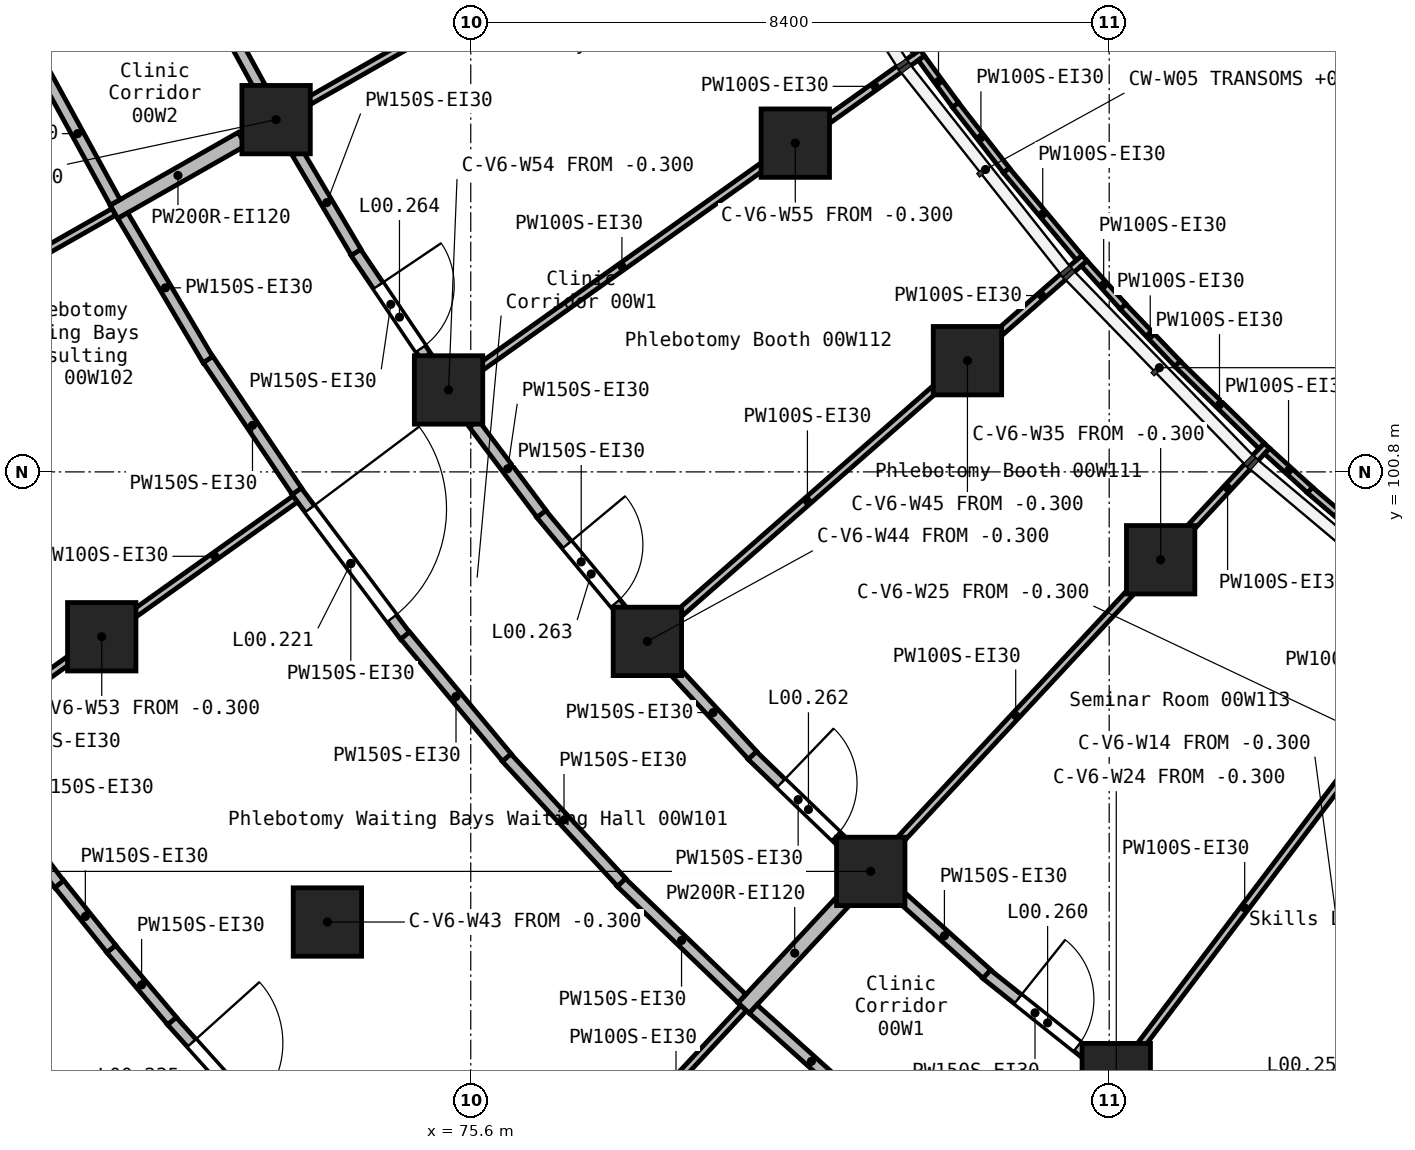
"""IFC4 building model, lengths in metres.
Left out: names, types, materials, properties, quantities, classifications, styles, units other than length and angle.
Written with IfcOpenShell. Run it as: python <this file> out.ifc"""

import sys

from ifc_helpers import new_model, si_unit, direction, frame, frame_2d, origin, origin_2d, place, context, subcontext, project, spatial, rectangle, extrude, element, fill, save


model = new_model("IFC4")
c1 = context("Model", 3, precision=1e-05, world=origin(), true_north=direction((0.0, 1.0)))
c2 = subcontext(c1, "Body", "Model", "MODEL_VIEW")
j1 = project(units=[si_unit("LENGTHUNIT", "METRE"), si_unit("PLANEANGLEUNIT", "RADIAN")], contexts=[c1])
p1 = place(None, origin())
s1 = spatial("IfcSite", under=j1, at=p1, CompositionType="ELEMENT")
p2 = place(p1, origin())
s2 = spatial("IfcBuilding", under=s1, at=p2, CompositionType="ELEMENT")
p3 = place(p2, origin())
s3 = spatial("IfcBuildingStorey", under=s2, at=p3, CompositionType="ELEMENT", Elevation=0.0)
for number, where, z_axis, x_axis in (
    (1, (70.745, 98.631, -0.3), (0.0, 0.0, 1.0), (1.0, 0.0, 0.0)),
    (2, (73.039, 105.434, -0.3), (0.0, 0.0, 1.0), (1.0, 0.0, 0.0)),
    (3, (73.714, 94.878, -0.3), (0.0, 0.0, 1.0), (1.0, 0.0, 0.0)),
    (4, (75.308, 101.878, -0.3), (0.0, 0.0, 1.0), (1.0, 0.0, 0.0)),
    (5, (77.924, 98.57, -0.3), (0.0, 0.0, 1.0), (1.0, 0.0, 0.0)),
    (6, (79.87, 105.125, -0.3), (0.0, 0.0, 1.0), (1.0, 0.0, 0.0)),
    (7, (80.863, 95.544, -0.3), (0.0, 0.0, 1.0), (1.0, 0.0, 0.0)),
    (8, (82.135, 102.263, -0.3), (0.0, 0.0, 1.0), (1.0, 0.0, 0.0)),
    (9, (84.093, 92.831, -0.3), (0.0, 0.0, 1.0), (1.0, 0.0, 0.0)),
    (10, (84.677, 99.644, -0.3), (0.0, 0.0, 1.0), (1.0, 0.0, 0.0)),
):
    element("IfcColumn", number, at=place(p3, frame(where, z_axis=z_axis, x_axis=x_axis)), inside=s3, PredefinedType="COLUMN", context=c2, shape_type="SweptSolid", body=[
        extrude(rectangle(XDim=0.9, YDim=0.9, at=origin_2d()), origin(), (0.0, 0.0, 1.0), 5.7),
    ])
p4 = place(p3, frame((70.905, 104.221, 0.0), z_axis=(0.0, 0.0, 1.0), x_axis=(0.869256176146, 0.494361912198, 0.0)))
e11 = element("IfcWall", 11, at=p4, inside=s3, PredefinedType="SOLIDWALL", context=c2, shape_type="SweptSolid", body=[
    extrude(rectangle(XDim=1.939, YDim=0.2, at=frame_2d((0.97, 0.0))), origin(), (0.0, 0.0, 1.0), 5.05),
])
p5 = place(p3, frame((79.19, 93.746, 0.0), z_axis=(0.0, 0.0, 1.0), x_axis=(0.681171780306, 0.732123627344, 0.0)))
e12 = element("IfcWall", 12, at=p5, inside=s3, PredefinedType="SOLIDWALL", context=c2, shape_type="SweptSolid", body=[
    extrude(rectangle(XDim=1.974, YDim=0.2, at=frame_2d((0.987, 0.0))), origin(), (0.0, 0.0, 1.0), 5.05),
])
p6 = place(p3, frame((73.307, 100.547, 0.0), z_axis=(0.0, 0.0, 1.0), x_axis=(0.600377090661, -0.799717043091, 0.0)))
e13 = element("IfcWall", 13, at=p6, inside=s3, PredefinedType="PARTITIONING", context=c2, shape_type="SweptSolid", body=[
    extrude(rectangle(XDim=2.382, YDim=0.15, at=frame_2d((1.191, 0.0))), origin(), (0.0, 0.0, 1.0), 5.05),
])
p7 = place(p6, frame((0.291, 0.0, 0.0)))
e14 = element("IfcOpeningElement", 14, at=p7, cuts=e13, PredefinedType="OPENING", context=c2, shape_type="SweptSolid", body=[
    extrude(rectangle(XDim=1.8, YDim=2.1, at=frame_2d((0.9, 1.05))), frame((0.0, 0.085, 0.0), z_axis=(0.0, -1.0, 0.0), x_axis=(1.0, 0.0, 0.0)), (0.0, 0.0, 1.0), 0.17),
])
p8 = place(p3, frame((77.579, 95.4, 0.0), z_axis=(0.0, 0.0, 1.0), x_axis=(0.720594722174, -0.693356507415, 0.0)))
e15 = element("IfcWall", 15, at=p8, inside=s3, PredefinedType="PARTITIONING", context=c2, shape_type="SweptSolid", body=[
    extrude(rectangle(XDim=2.205, YDim=0.15, at=frame_2d((1.103, 0.0))), origin(), (0.0, 0.0, 1.0), 5.05),
])
p9 = place(p3, frame((76.069, 97.043, 0.0), z_axis=(0.0, 0.0, 1.0), x_axis=(0.678030610295, -0.735033666918, 0.0)))
e16 = element("IfcWall", 16, at=p9, inside=s3, PredefinedType="PARTITIONING", context=c2, shape_type="SweptSolid", body=[
    extrude(rectangle(XDim=2.236, YDim=0.15, at=frame_2d((1.118, 0.0))), origin(), (0.0, 0.0, 1.0), 5.05),
])
p10 = place(p3, frame((71.021, 104.171, 0.0), z_axis=(0.0, 0.0, 1.0), x_axis=(0.50873677225, -0.860922119916, 0.0)))
e17 = element("IfcWall", 17, at=p10, inside=s3, PredefinedType="PARTITIONING", context=c2, shape_type="SweptSolid", body=[
    extrude(rectangle(XDim=2.205, YDim=0.15, at=frame_2d((1.103, 0.0))), origin(), (0.0, 0.0, 1.0), 5.05),
])
p11 = place(p3, frame((79.316, 93.733, 0.0), z_axis=(0.0, 0.0, 1.0), x_axis=(0.74346507851, -0.668774758073, 0.0)))
e18 = element("IfcWall", 18, at=p11, inside=s3, PredefinedType="PARTITIONING", context=c2, shape_type="SweptSolid", body=[
    extrude(rectangle(XDim=2.059, YDim=0.15, at=frame_2d((1.03, 0.0))), origin(), (0.0, 0.0, 1.0), 5.05),
])
p12 = place(p3, frame((72.145, 102.278, 0.0), z_axis=(0.0, 0.0, 1.0), x_axis=(0.558900636953, -0.829234633873, 0.0)))
e19 = element("IfcWall", 19, at=p12, inside=s3, PredefinedType="PARTITIONING", context=c2, shape_type="SweptSolid", body=[
    extrude(rectangle(XDim=2.089, YDim=0.15, at=frame_2d((1.044, 0.0))), origin(), (0.0, 0.0, 1.0), 5.05),
])
p13 = place(p3, frame((74.738, 98.647, 0.0), z_axis=(0.0, 0.0, 1.0), x_axis=(0.640000381719, -0.768374590548, 0.0)))
e20 = element("IfcWall", 20, at=p13, inside=s3, PredefinedType="PARTITIONING", context=c2, shape_type="SweptSolid", body=[
    extrude(rectangle(XDim=2.088, YDim=0.15, at=frame_2d((1.044, 0.0))), origin(), (0.0, 0.0, 1.0), 5.05),
])
p14 = place(p3, frame((69.933, 106.153, 0.0), z_axis=(0.0, 0.0, 1.0), x_axis=(0.479964929401, -0.877287676047, 0.0)))
e21 = element("IfcWall", 21, at=p14, inside=s3, PredefinedType="PARTITIONING", context=c2, shape_type="SweptSolid", body=[
    extrude(rectangle(XDim=2.059, YDim=0.15, at=frame_2d((1.03, 0.0))), origin(), (0.0, 0.0, 1.0), 5.05),
])
p15 = place(p3, frame((74.086, 103.69, 0.0), z_axis=(0.0, 0.0, 1.0), x_axis=(0.558985889655, -0.829177167538, 0.0)))
e22 = element("IfcWall", 22, at=p15, inside=s3, PredefinedType="PARTITIONING", context=c2, shape_type="SweptSolid", body=[
    extrude(rectangle(XDim=1.654, YDim=0.15, at=frame_2d((0.827, 0.0))), origin(), (0.0, 0.0, 1.0), 5.05),
])
p16 = place(p15, frame((0.53, 0.0, 0.0)))
e23 = element("IfcOpeningElement", 23, at=p16, cuts=e22, PredefinedType="OPENING", context=c2, shape_type="SweptSolid", body=[
    extrude(rectangle(XDim=1.0, YDim=2.1, at=frame_2d((0.5, 1.05))), frame((0.0, 0.085, 0.0), z_axis=(0.0, -1.0, 0.0), x_axis=(1.0, 0.0, 0.0)), (0.0, 0.0, 1.0), 0.17),
])
p17 = place(p3, frame((82.385, 94.194, 0.0), z_axis=(0.0, 0.0, 1.0), x_axis=(0.781756052881, -0.623584375833, 0.0)))
e24 = element("IfcWall", 24, at=p17, inside=s3, PredefinedType="PARTITIONING", context=c2, shape_type="SweptSolid", body=[
    extrude(rectangle(XDim=1.636, YDim=0.15, at=frame_2d((0.818, 0.0))), origin(), (0.0, 0.0, 1.0), 5.05),
])
p18 = place(p17, frame((0.53, 0.0, 0.0)))
e25 = element("IfcOpeningElement", 25, at=p18, cuts=e24, PredefinedType="OPENING", context=c2, shape_type="SweptSolid", body=[
    extrude(rectangle(XDim=1.0, YDim=2.1, at=frame_2d((0.5, 1.05))), frame((0.0, 0.085, 0.0), z_axis=(0.0, -1.0, 0.0), x_axis=(1.0, 0.0, 0.0)), (0.0, 0.0, 1.0), 0.17),
])
p19 = place(p3, frame((79.301, 97.072, 0.0), z_axis=(0.0, 0.0, 1.0), x_axis=(0.720465115712, -0.69349118022, 0.0)))
e26 = element("IfcWall", 26, at=p19, inside=s3, PredefinedType="PARTITIONING", context=c2, shape_type="SweptSolid", body=[
    extrude(rectangle(XDim=1.684, YDim=0.15, at=frame_2d((0.842, 0.0))), origin(), (0.0, 0.0, 1.0), 5.05),
])
p20 = place(p19, frame((0.53, 0.0, 0.0)))
e27 = element("IfcOpeningElement", 27, at=p20, cuts=e26, PredefinedType="OPENING", context=c2, shape_type="SweptSolid", body=[
    extrude(rectangle(XDim=1.0, YDim=2.1, at=frame_2d((0.5, 1.05))), frame((0.0, 0.085, 0.0), z_axis=(0.0, -1.0, 0.0), x_axis=(1.0, 0.0, 0.0)), (0.0, 0.0, 1.0), 0.17),
])
p21 = place(p3, frame((78.27, 98.195, 0.0), z_axis=(0.0, 0.0, 1.0), x_axis=(0.678273469528, -0.73480956753, 0.0)))
e28 = element("IfcWall", 28, at=p21, inside=s3, PredefinedType="PARTITIONING", context=c2, shape_type="SweptSolid", body=[
    extrude(rectangle(XDim=1.529, YDim=0.15, at=frame_2d((0.764, 0.0))), origin(), (0.0, 0.0, 1.0), 5.05),
])
p22 = place(p3, frame((76.526, 100.249, 0.0), z_axis=(0.0, 0.0, 1.0), x_axis=(0.640038659854, -0.768342706019, 0.0)))
e29 = element("IfcWall", 29, at=p22, inside=s3, PredefinedType="PARTITIONING", context=c2, shape_type="SweptSolid", body=[
    extrude(rectangle(XDim=1.648, YDim=0.15, at=frame_2d((0.824, 0.0))), origin(), (0.0, 0.0, 1.0), 5.05),
])
p23 = place(p22, frame((0.53, 0.0, 0.0)))
e30 = element("IfcOpeningElement", 30, at=p23, cuts=e29, PredefinedType="OPENING", context=c2, shape_type="SweptSolid", body=[
    extrude(rectangle(XDim=1.0, YDim=2.1, at=frame_2d((0.5, 1.05))), frame((0.0, 0.085, 0.0), z_axis=(0.0, -1.0, 0.0), x_axis=(1.0, 0.0, 0.0)), (0.0, 0.0, 1.0), 0.17),
])
p24 = place(p3, frame((73.319, 104.997, 0.0), z_axis=(0.0, 0.0, 1.0), x_axis=(0.508740142918, -0.86092012811, 0.0)))
e31 = element("IfcWall", 31, at=p24, inside=s3, PredefinedType="PARTITIONING", context=c2, shape_type="SweptSolid", body=[
    extrude(rectangle(XDim=1.519, YDim=0.15, at=frame_2d((0.759, 0.0))), origin(), (0.0, 0.0, 1.0), 5.05),
])
p25 = place(p3, frame((75.641, 101.434, 0.0), z_axis=(0.0, 0.0, 1.0), x_axis=(0.60023710435, -0.799822116825, 0.0)))
e32 = element("IfcWall", 32, at=p25, inside=s3, PredefinedType="PARTITIONING", context=c2, shape_type="SweptSolid", body=[
    extrude(rectangle(XDim=1.483, YDim=0.15, at=frame_2d((0.741, 0.0))), origin(), (0.0, 0.0, 1.0), 5.05),
])
p26 = place(p3, frame((81.273, 95.199, 0.0), z_axis=(0.0, 0.0, 1.0), x_axis=(0.743576936712, -0.668650386368, 0.0)))
e33 = element("IfcWall", 33, at=p26, inside=s3, PredefinedType="PARTITIONING", context=c2, shape_type="SweptSolid", body=[
    extrude(rectangle(XDim=1.502, YDim=0.15, at=frame_2d((0.751, 0.0))), origin(), (0.0, 0.0, 1.0), 5.05),
])
p27 = place(p3, frame((72.077, 107.232, 0.0), z_axis=(0.0, 0.0, 1.0), x_axis=(0.480041086357, -0.877246006209, 0.0)))
e34 = element("IfcWall", 34, at=p27, inside=s3, PredefinedType="PARTITIONING", context=c2, shape_type="SweptSolid", body=[
    extrude(rectangle(XDim=1.553, YDim=0.15, at=frame_2d((0.777, 0.0))), origin(), (0.0, 0.0, 1.0), 5.05),
])
p28 = place(p3, frame((71.667, 93.577, 0.0), z_axis=(0.0, 0.0, 1.0), x_axis=(0.668733315137, -0.743502355898, 0.0)))
e35 = element("IfcWall", 35, at=p28, inside=s3, PredefinedType="PARTITIONING", context=c2, shape_type="SweptSolid", body=[
    extrude(rectangle(XDim=1.982, YDim=0.15, at=frame_2d((0.991, 0.0))), origin(), (0.0, 0.0, 1.0), 5.05),
])
p29 = place(p28, frame((0.391, 0.0, 0.0)))
e36 = element("IfcOpeningElement", 36, at=p29, cuts=e35, PredefinedType="OPENING", context=c2, shape_type="SweptSolid", body=[
    extrude(rectangle(XDim=1.2, YDim=2.1, at=frame_2d((0.6, 1.05))), frame((0.0, 0.085, 0.0), z_axis=(0.0, -1.0, 0.0), x_axis=(1.0, 0.0, 0.0)), (0.0, 0.0, 1.0), 0.17),
])
p30 = place(p3, frame((69.433, 96.362, 0.0), z_axis=(0.0, 0.0, 1.0), x_axis=(0.606457599152, -0.795115828311, 0.0)))
e37 = element("IfcWall", 37, at=p30, inside=s3, PredefinedType="PARTITIONING", context=c2, shape_type="SweptSolid", body=[
    extrude(rectangle(XDim=1.242, YDim=0.15, at=frame_2d((0.621, 0.0))), origin(), (0.0, 0.0, 1.0), 5.05),
])
p31 = place(p3, frame((70.869, 94.525, 0.0), z_axis=(0.0, 0.0, 1.0), x_axis=(0.645236922374, -0.763982535144, 0.0)))
e38 = element("IfcWall", 38, at=p31, inside=s3, PredefinedType="PARTITIONING", context=c2, shape_type="SweptSolid", body=[
    extrude(rectangle(XDim=1.242, YDim=0.15, at=frame_2d((0.621, 0.0))), origin(), (0.0, 0.0, 1.0), 5.05),
])
p32 = place(p3, frame((70.187, 95.377, 0.0), z_axis=(0.0, 0.0, 1.0), x_axis=(0.626301399266, -0.779581013928, 0.0)))
e39 = element("IfcWall", 39, at=p32, inside=s3, PredefinedType="PARTITIONING", context=c2, shape_type="SweptSolid", body=[
    extrude(rectangle(XDim=1.093, YDim=0.15, at=frame_2d((0.546, 0.0))), origin(), (0.0, 0.0, 1.0), 5.05),
])
p33 = place(p3, frame((84.418, 93.26, 0.0), z_axis=(0.0, 0.0, 1.0), x_axis=(0.603501117064, 0.797362152163, 0.0)))
e40 = element("IfcWall", 40, at=p33, inside=s3, PredefinedType="PARTITIONING", context=c2, shape_type="SweptSolid", body=[
    extrude(rectangle(XDim=4.522, YDim=0.1, at=frame_2d((2.261, 0.0))), origin(), (0.0, 0.0, 1.0), 5.05),
])
p34 = place(p3, frame((78.338, 98.933, 0.0), z_axis=(0.0, 0.0, 1.0), x_axis=(0.751823288541, 0.659364650863, 0.0)))
e41 = element("IfcWall", 41, at=p34, inside=s3, PredefinedType="PARTITIONING", context=c2, shape_type="SweptSolid", body=[
    extrude(rectangle(XDim=4.5, YDim=0.1, at=frame_2d((2.25, 0.0))), origin(), (0.0, 0.0, 1.0), 5.05),
])
p35 = place(p3, frame((82.549, 102.626, 0.0), z_axis=(0.0, 0.0, 1.0), x_axis=(0.751798799024, 0.659392573347, 0.0)))
e42 = element("IfcWall", 42, at=p35, inside=s3, PredefinedType="PARTITIONING", context=c2, shape_type="SweptSolid", body=[
    extrude(rectangle(XDim=1.498, YDim=0.1, at=frame_2d((0.749, 0.0))), origin(), (0.0, 0.0, 1.0), 5.05),
])
p36 = place(p3, frame((75.736, 102.183, 0.0), z_axis=(0.0, 0.0, 1.0), x_axis=(0.8147152487, 0.579861245072, 0.0)))
e43 = element("IfcWall", 43, at=p36, inside=s3, PredefinedType="PARTITIONING", context=c2, shape_type="SweptSolid", body=[
    extrude(rectangle(XDim=4.548, YDim=0.1, at=frame_2d((2.274, 0.0))), origin(), (0.0, 0.0, 1.0), 5.05),
])
p37 = place(p3, frame((80.298, 105.43, 0.0), z_axis=(0.0, 0.0, 1.0), x_axis=(0.814728250396, 0.579842977027, 0.0)))
e44 = element("IfcWall", 44, at=p37, inside=s3, PredefinedType="PARTITIONING", context=c2, shape_type="SweptSolid", body=[
    extrude(rectangle(XDim=1.524, YDim=0.1, at=frame_2d((0.762, 0.0))), origin(), (0.0, 0.0, 1.0), 5.05),
])
p38 = place(p3, frame((81.227, 95.935, 0.0), z_axis=(0.0, 0.0, 1.0), x_axis=(0.681211440492, 0.732086725288, 0.0)))
e45 = element("IfcWall", 45, at=p38, inside=s3, PredefinedType="PARTITIONING", context=c2, shape_type="SweptSolid", body=[
    extrude(rectangle(XDim=4.53, YDim=0.1, at=frame_2d((2.265, 0.0))), origin(), (0.0, 0.0, 1.0), 5.05),
])
p39 = place(p3, frame((85.041, 100.034, 0.0), z_axis=(0.0, 0.0, 1.0), x_axis=(0.681296599079, 0.732007475428, 0.0)))
e46 = element("IfcWall", 46, at=p39, inside=s3, PredefinedType="PARTITIONING", context=c2, shape_type="SweptSolid", body=[
    extrude(rectangle(XDim=1.517, YDim=0.1, at=frame_2d((0.758, 0.0))), origin(), (0.0, 0.0, 1.0), 5.05),
])
p40 = place(p3, frame((73.463, 105.676, 0.0), z_axis=(0.0, 0.0, 1.0), x_axis=(0.8692549769, 0.494364020874, 0.0)))
e47 = element("IfcWall", 47, at=p40, inside=s3, PredefinedType="PARTITIONING", context=c2, shape_type="SweptSolid", body=[
    extrude(rectangle(XDim=4.625, YDim=0.1, at=frame_2d((2.312, 0.0))), origin(), (0.0, 0.0, 1.0), 5.05),
])
p41 = place(p3, frame((68.595, 102.907, 0.0), z_axis=(0.0, 0.0, 1.0), x_axis=(0.869270757215, 0.494336272846, 0.0)))
e48 = element("IfcWall", 48, at=p41, inside=s3, PredefinedType="PARTITIONING", context=c2, shape_type="SweptSolid", body=[
    extrude(rectangle(XDim=2.656, YDim=0.1, at=frame_2d((1.328, 0.0))), origin(), (0.0, 0.0, 1.0), 5.05),
])
p42 = place(p3, frame((77.412, 91.835, 0.0), z_axis=(0.0, 0.0, 1.0), x_axis=(0.681147107729, 0.732146582067, 0.0)))
e49 = element("IfcWall", 49, at=p42, inside=s3, PredefinedType="PARTITIONING", context=c2, shape_type="SweptSolid", body=[
    extrude(rectangle(XDim=2.609, YDim=0.1, at=frame_2d((1.304, 0.0))), origin(), (0.0, 0.0, 1.0), 5.05),
])
p43 = place(p3, frame((68.861, 97.29, 0.0), z_axis=(0.0, 0.0, 1.0), x_axis=(0.814701484378, 0.5798805837, 0.0)))
e50 = element("IfcWall", 50, at=p43, inside=s3, PredefinedType="PARTITIONING", context=c2, shape_type="SweptSolid", body=[
    extrude(rectangle(XDim=1.787, YDim=0.1, at=frame_2d((0.894, 0.0))), origin(), (0.0, 0.0, 1.0), 5.05),
])
p44 = place(p3, frame((71.173, 98.936, 0.0), z_axis=(0.0, 0.0, 1.0), x_axis=(0.814672160951, 0.579921779355, 0.0)))
e51 = element("IfcWall", 51, at=p44, inside=s3, PredefinedType="PARTITIONING", context=c2, shape_type="SweptSolid", body=[
    extrude(rectangle(XDim=2.598, YDim=0.1, at=frame_2d((1.299, 0.0))), origin(), (0.0, 0.0, 1.0), 5.05),
])
p45 = place(p3, frame((84.897, 102.224, 0.0), z_axis=(0.0, 0.0, 1.0), x_axis=(0.715491637519, -0.698621297013, 0.0)))
e52 = element("IfcWall", 52, at=p45, inside=s3, PredefinedType="PARTITIONING", context=c2, shape_type="SweptSolid", body=[
    extrude(rectangle(XDim=1.548, YDim=0.1, at=frame_2d((0.774, 0.0))), origin(), (0.0, 0.0, 1.0), 5.05),
])
p46 = place(p3, frame((82.645, 104.768, 0.0), z_axis=(0.0, 0.0, 1.0), x_axis=(0.641529064264, -0.767098728785, 0.0)))
e53 = element("IfcWall", 53, at=p46, inside=s3, PredefinedType="PARTITIONING", context=c2, shape_type="SweptSolid", body=[
    extrude(rectangle(XDim=1.499, YDim=0.1, at=frame_2d((0.75, 0.0))), origin(), (0.0, 0.0, 1.0), 5.05),
])
p47 = place(p3, frame((80.657, 107.527, 0.0), z_axis=(0.0, 0.0, 1.0), x_axis=(0.561086061718, -0.827757471332, 0.0)))
e54 = element("IfcWall", 54, at=p47, inside=s3, PredefinedType="PARTITIONING", context=c2, shape_type="SweptSolid", body=[
    extrude(rectangle(XDim=1.452, YDim=0.1, at=frame_2d((0.726, 0.0))), origin(), (0.0, 0.0, 1.0), 5.05),
])
p48 = place(p3, frame((81.977, 105.628, 0.0), z_axis=(0.0, 0.0, 1.0), x_axis=(0.61437453726, -0.78901452963, 0.0)))
e55 = element("IfcWall", 55, at=p48, inside=s3, PredefinedType="PARTITIONING", context=c2, shape_type="SweptSolid", body=[
    extrude(rectangle(XDim=1.09, YDim=0.1, at=frame_2d((0.545, 0.0))), origin(), (0.0, 0.0, 1.0), 5.05),
])
p49 = place(p3, frame((84.18, 102.976, 0.0), z_axis=(0.0, 0.0, 1.0), x_axis=(0.691094804644, -0.722764118502, 0.0)))
e56 = element("IfcWall", 56, at=p49, inside=s3, PredefinedType="PARTITIONING", context=c2, shape_type="SweptSolid", body=[
    extrude(rectangle(XDim=1.041, YDim=0.1, at=frame_2d((0.521, 0.0))), origin(), (0.0, 0.0, 1.0), 5.05),
])
p50 = place(p3, frame((86.64, 100.562, 0.0), z_axis=(0.0, 0.0, 1.0), x_axis=(0.759638737838, -0.650345283658, 0.0)))
e57 = element("IfcWall", 57, at=p50, inside=s3, PredefinedType="PARTITIONING", context=c2, shape_type="SweptSolid", body=[
    extrude(rectangle(XDim=0.992, YDim=0.1, at=frame_2d((0.496, 0.0))), origin(), (0.0, 0.0, 1.0), 5.05),
])
p51 = place(p3, frame((83.672, 103.543, 0.0), z_axis=(0.0, 0.0, 1.0), x_axis=(0.66903540409, -0.743230534945, 0.0)))
e58 = element("IfcWall", 58, at=p51, inside=s3, PredefinedType="PARTITIONING", context=c2, shape_type="SweptSolid", body=[
    extrude(rectangle(XDim=0.763, YDim=0.1, at=frame_2d((0.382, 0.0))), origin(), (0.0, 0.0, 1.0), 5.05),
])
p52 = place(p3, frame((81.529, 106.244, 0.0), z_axis=(0.0, 0.0, 1.0), x_axis=(0.590281268128, -0.807197636578, 0.0)))
e59 = element("IfcWall", 59, at=p52, inside=s3, PredefinedType="PARTITIONING", context=c2, shape_type="SweptSolid", body=[
    extrude(rectangle(XDim=0.763, YDim=0.1, at=frame_2d((0.382, 0.0))), origin(), (0.0, 0.0, 1.0), 5.05),
])
p53 = place(p3, frame((86.077, 101.074, 0.0), z_axis=(0.0, 0.0, 1.0), x_axis=(0.740693092669, -0.671843540173, 0.0)))
e60 = element("IfcWall", 60, at=p53, inside=s3, PredefinedType="PARTITIONING", context=c2, shape_type="SweptSolid", body=[
    extrude(rectangle(XDim=0.762, YDim=0.1, at=frame_2d((0.381, 0.0))), origin(), (0.0, 0.0, 1.0), 5.05),
])
p54 = place(p7, origin())
e61 = element("IfcDoor", 61, at=p54, inside=s3, OperationType="DOUBLE_DOOR_SINGLE_SWING", PredefinedType="DOOR", context=c2, shape_type="SweptSolid", body=[
    extrude(rectangle(XDim=1.8, YDim=2.1, at=frame_2d((0.9, 1.05))), frame((0.0, 0.025, 0.0), z_axis=(0.0, -1.0, 0.0), x_axis=(1.0, 0.0, 0.0)), (0.0, 0.0, 1.0), 0.05),
])
fill(e14, e61)
p55 = place(p29, frame((1.2, 0.0, 0.0), z_axis=(0.0, 0.0, 1.0), x_axis=(-1.0, 0.0, 0.0)))
e62 = element("IfcDoor", 62, at=p55, inside=s3, OperationType="SINGLE_SWING_RIGHT", PredefinedType="DOOR", context=c2, shape_type="SweptSolid", body=[
    extrude(rectangle(XDim=1.2, YDim=2.1, at=frame_2d((0.6, 1.05))), frame((0.0, 0.025, 0.0), z_axis=(0.0, -1.0, 0.0), x_axis=(1.0, 0.0, 0.0)), (0.0, 0.0, 1.0), 0.05),
])
fill(e36, e62)
p56 = place(p18, origin())
e63 = element("IfcDoor", 63, at=p56, inside=s3, OperationType="SINGLE_SWING_RIGHT", PredefinedType="DOOR", context=c2, shape_type="SweptSolid", body=[
    extrude(rectangle(XDim=1.0, YDim=2.1, at=frame_2d((0.5, 1.05))), frame((0.0, 0.025, 0.0), z_axis=(0.0, -1.0, 0.0), x_axis=(1.0, 0.0, 0.0)), (0.0, 0.0, 1.0), 0.05),
])
fill(e25, e63)
p57 = place(p20, origin())
e64 = element("IfcDoor", 64, at=p57, inside=s3, OperationType="SINGLE_SWING_RIGHT", PredefinedType="DOOR", context=c2, shape_type="SweptSolid", body=[
    extrude(rectangle(XDim=1.0, YDim=2.1, at=frame_2d((0.5, 1.05))), frame((0.0, 0.025, 0.0), z_axis=(0.0, -1.0, 0.0), x_axis=(1.0, 0.0, 0.0)), (0.0, 0.0, 1.0), 0.05),
])
fill(e27, e64)
p58 = place(p23, origin())
e65 = element("IfcDoor", 65, at=p58, inside=s3, OperationType="SINGLE_SWING_RIGHT", PredefinedType="DOOR", context=c2, shape_type="SweptSolid", body=[
    extrude(rectangle(XDim=1.0, YDim=2.1, at=frame_2d((0.5, 1.05))), frame((0.0, 0.025, 0.0), z_axis=(0.0, -1.0, 0.0), x_axis=(1.0, 0.0, 0.0)), (0.0, 0.0, 1.0), 0.05),
])
fill(e30, e65)
p59 = place(p16, origin())
e66 = element("IfcDoor", 66, at=p59, inside=s3, OperationType="SINGLE_SWING_RIGHT", PredefinedType="DOOR", context=c2, shape_type="SweptSolid", body=[
    extrude(rectangle(XDim=1.0, YDim=2.1, at=frame_2d((0.5, 1.05))), frame((0.0, 0.025, 0.0), z_axis=(0.0, -1.0, 0.0), x_axis=(1.0, 0.0, 0.0)), (0.0, 0.0, 1.0), 0.05),
])
fill(e23, e66)
save(model, sys.argv[1])
